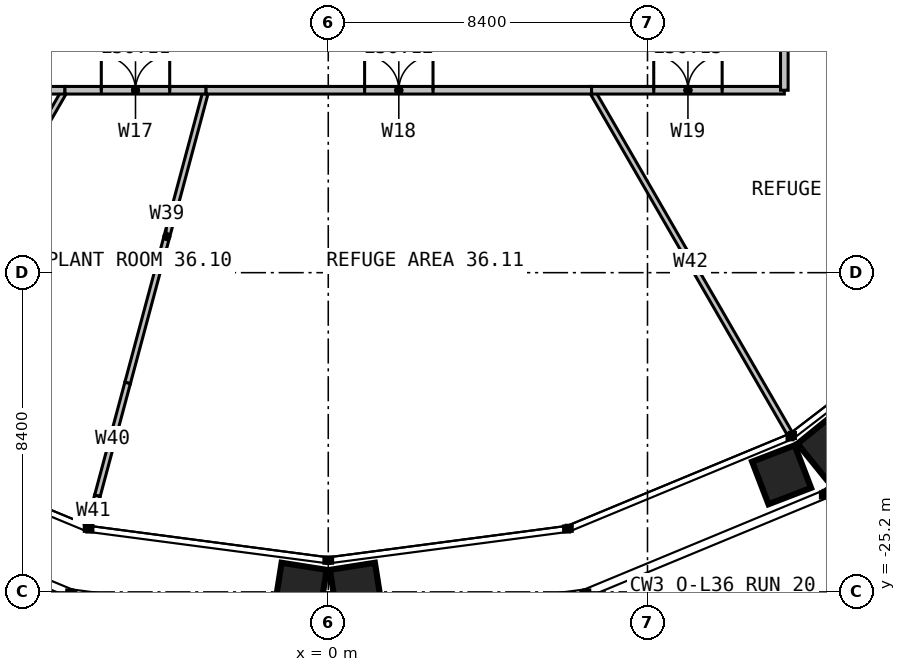
"""IFC4 building model, lengths in metres.
Left out: names, types, materials, properties, quantities, classifications, styles, units other than length and angle.
Written with IfcOpenShell. Run it as: python <this file> out.ifc"""

import sys

from ifc_helpers import new_model, si_unit, direction, frame, frame_2d, origin, place, context, subcontext, project, spatial, rectangle, extrude, element, fill, save


model = new_model("IFC4")
c1 = context("Model", 3, precision=1e-05, world=origin(), true_north=direction((0.0, 1.0)))
c2 = subcontext(c1, "Body", "Model", "MODEL_VIEW")
j1 = project(units=[si_unit("LENGTHUNIT", "METRE"), si_unit("PLANEANGLEUNIT", "RADIAN")], contexts=[c1])
p1 = place(None, origin())
s1 = spatial("IfcSite", under=j1, at=p1, CompositionType="ELEMENT")
p2 = place(p1, origin())
s2 = spatial("IfcBuilding", under=s1, at=p2, CompositionType="ELEMENT")
p3 = place(p2, frame((0.0, 0.0, 150.0)))
s3 = spatial("IfcBuildingStorey", under=s2, at=p3, CompositionType="ELEMENT", Elevation=150.0)
p4 = place(p3, frame((-6.928, -12.0, 0.0), z_axis=(0.0, 0.0, 1.0), x_axis=(-0.500003616288, -0.866023315909, 0.0)))
e1 = element("IfcWall", 1, at=p4, inside=s3, PredefinedType="PARTITIONING", context=c2, shape_type="SweptSolid", body=[
    extrude(rectangle(XDim=10.423, YDim=0.15, at=frame_2d((5.211, 0.0))), origin(), (0.0, 0.0, 1.0), 4.8),
])
p5 = place(p3, frame((-3.215, -12.0, 0.0), z_axis=(0.0, 0.0, 1.0), x_axis=(-0.258826894995, -0.965923722882, 0.0)))
e2 = element("IfcWall", 2, at=p5, inside=s3, PredefinedType="PARTITIONING", context=c2, shape_type="SweptSolid", body=[
    extrude(rectangle(XDim=7.973, YDim=0.15, at=frame_2d((3.987, 0.0))), origin(), (0.0, 0.0, 1.0), 4.8),
])
p6 = place(p3, frame((-5.279, -19.702, 0.0), z_axis=(0.0, 0.0, 1.0), x_axis=(-0.258819472716, -0.96592571171, 0.0)))
e3 = element("IfcWall", 3, at=p6, inside=s3, PredefinedType="PARTITIONING", context=c2, shape_type="SweptSolid", body=[
    extrude(rectangle(XDim=3.073, YDim=0.15, at=frame_2d((1.537, 0.0))), origin(), (0.0, 0.0, 1.0), 3.79),
])
p7 = place(p3, frame((-6.074, -22.67, 0.0), z_axis=(0.0, 0.0, 1.0), x_axis=(-0.258826555959, -0.96592381373, 0.0)))
e4 = element("IfcWall", 4, at=p7, inside=s3, PredefinedType="PARTITIONING", context=c2, shape_type="SweptSolid", body=[
    extrude(rectangle(XDim=0.809, YDim=0.15, at=frame_2d((0.405, 0.0))), origin(), (0.0, 0.0, 1.0), 4.8),
])
p8 = place(p3, frame((6.928, -12.0, 0.0), z_axis=(0.0, 0.0, 1.0), x_axis=(0.500003616288, -0.866023315909, 0.0)))
e5 = element("IfcWall", 5, at=p8, inside=s3, PredefinedType="PARTITIONING", context=c2, shape_type="SweptSolid", body=[
    extrude(rectangle(XDim=10.423, YDim=0.15, at=frame_2d((5.211, 0.0))), origin(), (0.0, 0.0, 1.0), 4.8),
])
p9 = place(p3, frame((-12.0, -12.0, 0.0), z_axis=(0.0, 0.0, 1.0), x_axis=(1.0, 0.0, 0.0)))
e6 = element("IfcWall", 6, at=p9, inside=s3, PredefinedType="PARTITIONING", context=c2, shape_type="SweptSolid", body=[
    extrude(rectangle(XDim=5.072, YDim=0.2, at=frame_2d((2.536, 0.0))), origin(), (0.0, 0.0, 1.0), 4.8),
])
p10 = place(p3, frame((-6.928, -12.0, 0.0), z_axis=(0.0, 0.0, 1.0), x_axis=(1.0, 0.0, 0.0)))
e7 = element("IfcWall", 7, at=p10, inside=s3, PredefinedType="PARTITIONING", context=c2, shape_type="SweptSolid", body=[
    extrude(rectangle(XDim=3.713, YDim=0.2, at=frame_2d((1.856, 0.0))), origin(), (0.0, 0.0, 1.0), 4.8),
])
p11 = place(p10, frame((0.956, 0.0, 0.0)))
e8 = element("IfcOpeningElement", 8, at=p11, cuts=e7, PredefinedType="OPENING", context=c2, shape_type="SweptSolid", body=[
    extrude(rectangle(XDim=1.8, YDim=2.2, at=frame_2d((0.9, 1.1))), frame((0.0, 0.11, 0.0), z_axis=(0.0, -1.0, 0.0), x_axis=(1.0, 0.0, 0.0)), (0.0, 0.0, 1.0), 0.22),
])
p12 = place(p3, frame((-3.215, -12.0, 0.0), z_axis=(0.0, 0.0, 1.0), x_axis=(1.0, 0.0, 0.0)))
e9 = element("IfcWall", 9, at=p12, inside=s3, PredefinedType="PARTITIONING", context=c2, shape_type="SweptSolid", body=[
    extrude(rectangle(XDim=10.144, YDim=0.2, at=frame_2d((5.072, 0.0))), origin(), (0.0, 0.0, 1.0), 4.8),
])
p13 = place(p12, frame((4.172, 0.0, 0.0)))
e10 = element("IfcOpeningElement", 10, at=p13, cuts=e9, PredefinedType="OPENING", context=c2, shape_type="SweptSolid", body=[
    extrude(rectangle(XDim=1.8, YDim=2.2, at=frame_2d((0.9, 1.1))), frame((0.0, 0.11, 0.0), z_axis=(0.0, -1.0, 0.0), x_axis=(1.0, 0.0, 0.0)), (0.0, 0.0, 1.0), 0.22),
])
p14 = place(p3, frame((6.928, -12.0, 0.0), z_axis=(0.0, 0.0, 1.0), x_axis=(1.0, 0.0, 0.0)))
e11 = element("IfcWall", 11, at=p14, inside=s3, PredefinedType="PARTITIONING", context=c2, shape_type="SweptSolid", body=[
    extrude(rectangle(XDim=5.072, YDim=0.2, at=frame_2d((2.536, 0.0))), origin(), (0.0, 0.0, 1.0), 4.8),
])
p15 = place(p14, frame((1.636, 0.0, 0.0)))
e12 = element("IfcOpeningElement", 12, at=p15, cuts=e11, PredefinedType="OPENING", context=c2, shape_type="SweptSolid", body=[
    extrude(rectangle(XDim=1.8, YDim=2.2, at=frame_2d((0.9, 1.1))), frame((0.0, 0.11, 0.0), z_axis=(0.0, -1.0, 0.0), x_axis=(1.0, 0.0, 0.0)), (0.0, 0.0, 1.0), 0.22),
])
p16 = place(p3, frame((12.0, -12.0, 0.0), z_axis=(0.0, 0.0, 1.0), x_axis=(0.0, 1.0, 0.0)))
e13 = element("IfcWall", 13, at=p16, inside=s3, PredefinedType="PARTITIONING", context=c2, shape_type="SweptSolid", body=[
    extrude(rectangle(XDim=5.072, YDim=0.2, at=frame_2d((2.536, 0.0))), origin(), (0.0, 0.0, 1.0), 4.8),
])
p17 = place(p11, origin())
e14 = element("IfcDoor", 14, at=p17, inside=s3, OperationType="DOUBLE_DOOR_SINGLE_SWING", PredefinedType="DOOR", context=c2, shape_type="SweptSolid", body=[
    extrude(rectangle(XDim=1.8, YDim=2.2, at=frame_2d((0.9, 1.1))), frame((0.0, 0.025, 0.0), z_axis=(0.0, -1.0, 0.0), x_axis=(1.0, 0.0, 0.0)), (0.0, 0.0, 1.0), 0.05),
])
fill(e8, e14)
p18 = place(p13, origin())
e15 = element("IfcDoor", 15, at=p18, inside=s3, OperationType="DOUBLE_DOOR_SINGLE_SWING", PredefinedType="DOOR", context=c2, shape_type="SweptSolid", body=[
    extrude(rectangle(XDim=1.8, YDim=2.2, at=frame_2d((0.9, 1.1))), frame((0.0, 0.025, 0.0), z_axis=(0.0, -1.0, 0.0), x_axis=(1.0, 0.0, 0.0)), (0.0, 0.0, 1.0), 0.05),
])
fill(e10, e15)
p19 = place(p15, origin())
e16 = element("IfcDoor", 16, at=p19, inside=s3, OperationType="DOUBLE_DOOR_SINGLE_SWING", PredefinedType="DOOR", context=c2, shape_type="SweptSolid", body=[
    extrude(rectangle(XDim=1.8, YDim=2.2, at=frame_2d((0.9, 1.1))), frame((0.0, 0.025, 0.0), z_axis=(0.0, -1.0, 0.0), x_axis=(1.0, 0.0, 0.0)), (0.0, 0.0, 1.0), 0.05),
])
fill(e12, e16)
save(model, sys.argv[1])
